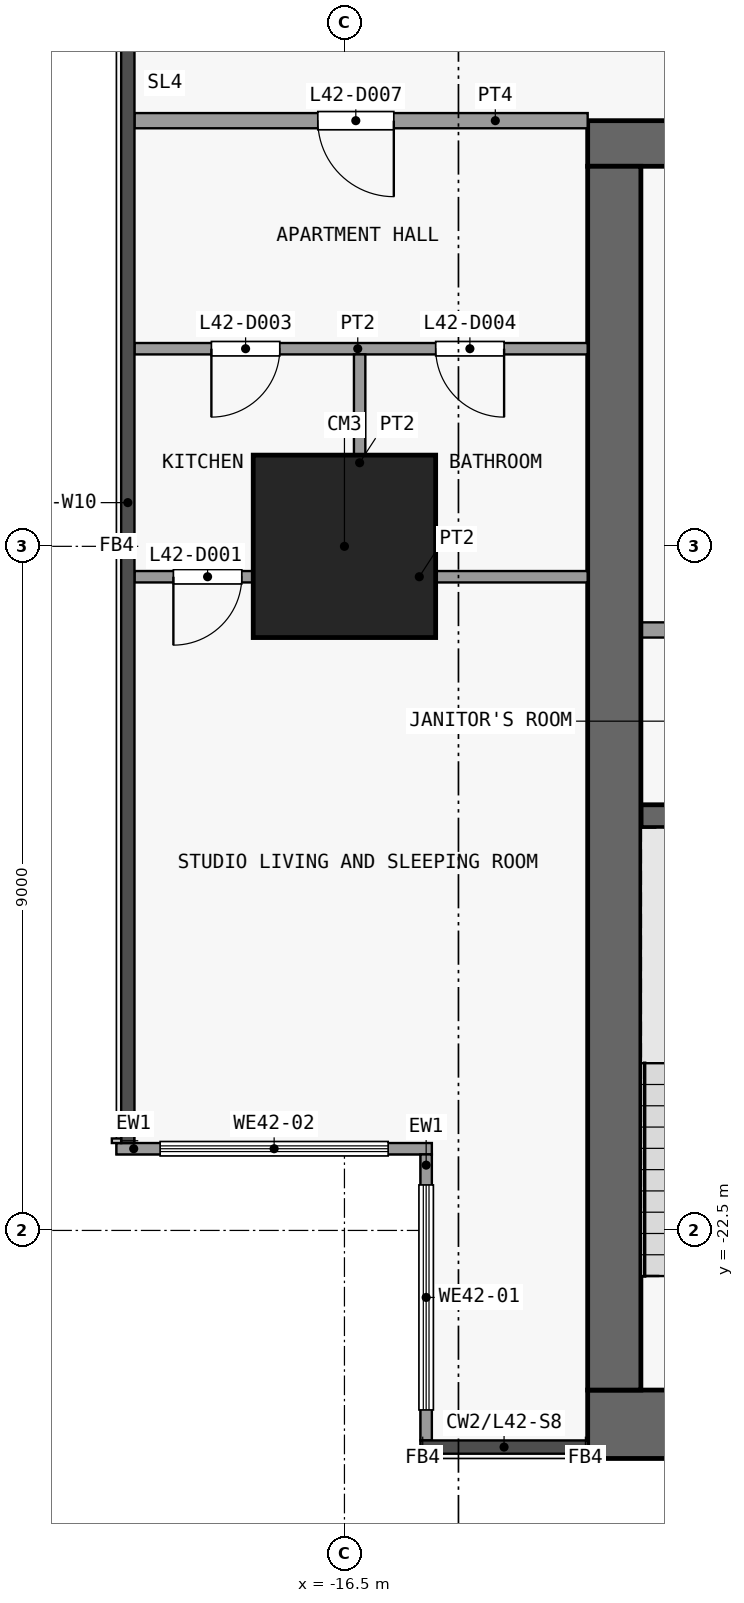
"""IFC4 building model, lengths in metres.
Left out: names, types, materials, properties, quantities, classifications, styles, units other than length and angle.
Written with IfcOpenShell. Run it as: python <this file> out.ifc"""

import sys

from ifc_helpers import new_model, si_unit, direction, frame, frame_2d, origin, origin_2d, place, context, subcontext, project, spatial, rectangle, extrude, element, fill, save


model = new_model("IFC4")
c1 = context("Model", 3, precision=1e-05, world=origin(), true_north=direction((0.0, 1.0)))
c2 = subcontext(c1, "Body", "Model", "MODEL_VIEW")
j1 = project(units=[si_unit("LENGTHUNIT", "METRE"), si_unit("PLANEANGLEUNIT", "RADIAN")], contexts=[c1])
p1 = place(None, origin())
s1 = spatial("IfcSite", under=j1, at=p1, CompositionType="ELEMENT")
p2 = place(p1, origin())
s2 = spatial("IfcBuilding", under=s1, at=p2, CompositionType="ELEMENT")
p3 = place(p2, frame((0.0, 0.0, 170.9)))
s3 = spatial("IfcBuildingStorey", under=s2, at=p3, CompositionType="ELEMENT", Elevation=170.9)
p4 = place(p3, frame((-16.5, -13.5, 0.0), z_axis=(0.0, 0.0, 1.0), x_axis=(1.0, 0.0, 0.0)))
e1 = element("IfcColumn", 1, at=p4, inside=s3, PredefinedType="COLUMN", context=c2, shape_type="SweptSolid", body=[
    extrude(rectangle(XDim=2.4, YDim=2.4, at=origin_2d()), origin(), (0.0, 0.0, 1.0), 3.6),
])
p5 = place(p3, frame((-13.3, -25.05, 0.0), z_axis=(0.0, 0.0, 1.0), x_axis=(1.0, 0.0, 0.0)))
e2 = element("IfcWall", 2, at=p5, inside=s3, PredefinedType="SHEAR", context=c2, shape_type="SweptSolid", body=[
    extrude(rectangle(XDim=26.6, YDim=0.9, at=frame_2d((13.3, 0.0))), origin(), (0.0, 0.0, 1.0), 3.3),
])
p6 = place(p3, frame((-13.3, -8.2, 0.0), z_axis=(0.0, 0.0, 1.0), x_axis=(1.0, 0.0, 0.0)))
e3 = element("IfcWall", 3, at=p6, inside=s3, PredefinedType="SHEAR", context=c2, shape_type="SweptSolid", body=[
    extrude(rectangle(XDim=26.6, YDim=0.6, at=frame_2d((13.3, 0.0))), origin(), (0.0, 0.0, 1.0), 3.3),
])
p7 = place(p6, frame((7.6, 0.0, 0.0)))
e4 = element("IfcOpeningElement", 4, at=p7, cuts=e3, PredefinedType="OPENING", context=c2, shape_type="SweptSolid", body=[
    extrude(rectangle(XDim=1.8, YDim=2.1, at=frame_2d((0.9, 1.05))), frame((0.0, 0.31, 0.0), z_axis=(0.0, -1.0, 0.0), x_axis=(1.0, 0.0, 0.0)), (0.0, 0.0, 1.0), 0.62),
])
p8 = place(p6, frame((17.2, 0.0, 0.0)))
e5 = element("IfcOpeningElement", 5, at=p8, cuts=e3, PredefinedType="OPENING", context=c2, shape_type="SweptSolid", body=[
    extrude(rectangle(XDim=1.8, YDim=2.1, at=frame_2d((0.9, 1.05))), frame((0.0, 0.31, 0.0), z_axis=(0.0, -1.0, 0.0), x_axis=(1.0, 0.0, 0.0)), (0.0, 0.0, 1.0), 0.62),
])
p9 = place(p6, frame((2.525, 0.0, 0.0)))
e6 = element("IfcOpeningElement", 6, at=p9, cuts=e3, PredefinedType="OPENING", context=c2, shape_type="SweptSolid", body=[
    extrude(rectangle(XDim=0.9, YDim=2.1, at=frame_2d((0.45, 1.05))), frame((0.0, 0.31, 0.0), z_axis=(0.0, -1.0, 0.0), x_axis=(1.0, 0.0, 0.0)), (0.0, 0.0, 1.0), 0.62),
])
p10 = place(p6, frame((23.175, 0.0, 0.0)))
e7 = element("IfcOpeningElement", 7, at=p10, cuts=e3, PredefinedType="OPENING", context=c2, shape_type="SweptSolid", body=[
    extrude(rectangle(XDim=0.9, YDim=2.1, at=frame_2d((0.45, 1.05))), frame((0.0, 0.31, 0.0), z_axis=(0.0, -1.0, 0.0), x_axis=(1.0, 0.0, 0.0)), (0.0, 0.0, 1.0), 0.62),
])
p11 = place(p3, frame((-12.95, -24.6, 0.0), z_axis=(0.0, 0.0, 1.0), x_axis=(0.0, 1.0, 0.0)))
e8 = element("IfcWall", 8, at=p11, inside=s3, PredefinedType="SHEAR", context=c2, shape_type="SweptSolid", body=[
    extrude(rectangle(XDim=16.1, YDim=0.7, at=frame_2d((8.05, 0.0))), origin(), (0.0, 0.0, 1.0), 3.3),
])
p12 = place(p3, frame((-12.6, -17.05, 0.0), z_axis=(0.0, 0.0, 1.0), x_axis=(1.0, 0.0, 0.0)))
e9 = element("IfcWall", 9, at=p12, inside=s3, PredefinedType="SHEAR", context=c2, shape_type="SweptSolid", body=[
    extrude(rectangle(XDim=3.1, YDim=0.3, at=frame_2d((1.55, 0.0))), origin(), (0.0, 0.0, 1.0), 3.3),
])
p13 = place(p3, frame((-12.6, -14.6, 0.0), z_axis=(0.0, 0.0, 1.0), x_axis=(1.0, 0.0, 0.0)))
e10 = element("IfcWall", 10, at=p13, inside=s3, PredefinedType="PARTITIONING", context=c2, shape_type="SweptSolid", body=[
    extrude(rectangle(XDim=1.45, YDim=0.2, at=frame_2d((0.725, 0.0))), origin(), (0.0, 0.0, 1.0), 3.3),
])
p14 = place(p3, frame((-15.425, -25.262, 0.0), z_axis=(0.0, 0.0, 1.0), x_axis=(0.0, 1.0, 0.0)))
e11 = element("IfcWall", 11, at=p14, inside=s3, PredefinedType="SOLIDWALL", context=c2, shape_type="SweptSolid", body=[
    extrude(rectangle(XDim=3.762, YDim=0.15, at=frame_2d((1.881, 0.0))), origin(), (0.0, 0.0, 1.0), 3.3),
])
p15 = place(p14, frame((0.401, 0.0, 0.9)))
e12 = element("IfcOpeningElement", 12, at=p15, cuts=e11, PredefinedType="OPENING", context=c2, shape_type="SweptSolid", body=[
    extrude(rectangle(XDim=2.96, YDim=2.4, at=frame_2d((1.48, 1.2))), frame((0.0, 0.085, 0.0), z_axis=(0.0, -1.0, 0.0), x_axis=(1.0, 0.0, 0.0)), (0.0, 0.0, 1.0), 0.17),
])
p16 = place(p3, frame((-15.35, -21.425, 0.0), z_axis=(0.0, 0.0, 1.0), x_axis=(-1.0, 0.0, 0.0)))
e13 = element("IfcWall", 13, at=p16, inside=s3, PredefinedType="SOLIDWALL", context=c2, shape_type="SweptSolid", body=[
    extrude(rectangle(XDim=4.15, YDim=0.15, at=frame_2d((2.075, 0.0))), origin(), (0.0, 0.0, 1.0), 3.3),
])
p17 = place(p16, frame((0.575, 0.0, 0.9)))
e14 = element("IfcOpeningElement", 14, at=p17, cuts=e13, PredefinedType="OPENING", context=c2, shape_type="SweptSolid", body=[
    extrude(rectangle(XDim=3.0, YDim=2.4, at=frame_2d((1.5, 1.2))), frame((0.0, 0.085, 0.0), z_axis=(0.0, -1.0, 0.0), x_axis=(1.0, 0.0, 0.0)), (0.0, 0.0, 1.0), 0.17),
])
p18 = place(p3, frame((-19.262, -13.9, 0.0), z_axis=(0.0, 0.0, 1.0), x_axis=(1.0, 0.0, 0.0)))
e15 = element("IfcWall", 15, at=p18, inside=s3, PredefinedType="PARTITIONING", context=c2, shape_type="SweptSolid", body=[
    extrude(rectangle(XDim=5.962, YDim=0.15, at=frame_2d((2.981, 0.0))), origin(), (0.0, 0.0, 1.0), 3.3),
])
p19 = place(p18, frame((0.512, 0.0, 0.0)))
e16 = element("IfcOpeningElement", 16, at=p19, cuts=e15, PredefinedType="OPENING", context=c2, shape_type="SweptSolid", body=[
    extrude(rectangle(XDim=0.9, YDim=2.1, at=frame_2d((0.45, 1.05))), frame((0.0, 0.085, 0.0), z_axis=(0.0, -1.0, 0.0), x_axis=(1.0, 0.0, 0.0)), (0.0, 0.0, 1.0), 0.17),
])
p20 = place(p3, frame((-19.262, -10.9, 0.0), z_axis=(0.0, 0.0, 1.0), x_axis=(1.0, 0.0, 0.0)))
e17 = element("IfcWall", 17, at=p20, inside=s3, PredefinedType="PARTITIONING", context=c2, shape_type="SweptSolid", body=[
    extrude(rectangle(XDim=5.962, YDim=0.15, at=frame_2d((2.981, 0.0))), origin(), (0.0, 0.0, 1.0), 3.3),
])
p21 = place(p20, frame((1.012, 0.0, 0.0)))
e18 = element("IfcOpeningElement", 18, at=p21, cuts=e17, PredefinedType="OPENING", context=c2, shape_type="SweptSolid", body=[
    extrude(rectangle(XDim=0.9, YDim=2.1, at=frame_2d((0.45, 1.05))), frame((0.0, 0.085, 0.0), z_axis=(0.0, -1.0, 0.0), x_axis=(1.0, 0.0, 0.0)), (0.0, 0.0, 1.0), 0.17),
])
p22 = place(p20, frame((3.963, 0.0, 0.0)))
e19 = element("IfcOpeningElement", 19, at=p22, cuts=e17, PredefinedType="OPENING", context=c2, shape_type="SweptSolid", body=[
    extrude(rectangle(XDim=0.9, YDim=2.1, at=frame_2d((0.45, 1.05))), frame((0.0, 0.085, 0.0), z_axis=(0.0, -1.0, 0.0), x_axis=(1.0, 0.0, 0.0)), (0.0, 0.0, 1.0), 0.17),
])
p23 = place(p3, frame((-19.262, -7.9, 0.0), z_axis=(0.0, 0.0, 1.0), x_axis=(1.0, 0.0, 0.0)))
e20 = element("IfcWall", 20, at=p23, inside=s3, PredefinedType="PARTITIONING", context=c2, shape_type="SweptSolid", body=[
    extrude(rectangle(XDim=5.962, YDim=0.2, at=frame_2d((2.981, 0.0))), origin(), (0.0, 0.0, 1.0), 3.3),
])
p24 = place(p23, frame((2.412, 0.0, 0.0)))
e21 = element("IfcOpeningElement", 21, at=p24, cuts=e20, PredefinedType="OPENING", context=c2, shape_type="SweptSolid", body=[
    extrude(rectangle(XDim=1.0, YDim=2.1, at=frame_2d((0.5, 1.05))), frame((0.0, 0.11, 0.0), z_axis=(0.0, -1.0, 0.0), x_axis=(1.0, 0.0, 0.0)), (0.0, 0.0, 1.0), 0.22),
])
p25 = place(p3, frame((-16.3, -13.825, 0.0), z_axis=(0.0, 0.0, 1.0), x_axis=(0.0, 1.0, 0.0)))
e22 = element("IfcWall", 22, at=p25, inside=s3, PredefinedType="PARTITIONING", context=c2, shape_type="SweptSolid", body=[
    extrude(rectangle(XDim=2.85, YDim=0.15, at=frame_2d((1.425, 0.0))), origin(), (0.0, 0.0, 1.0), 3.3),
])
p26 = place(p15, origin())
e23 = element("IfcWindow", 23, at=p26, inside=s3, PartitioningType="SINGLE_PANEL", PredefinedType="WINDOW", context=c2, shape_type="SweptSolid", body=[
    extrude(rectangle(XDim=2.96, YDim=2.4, at=frame_2d((1.48, 1.2))), frame((0.0, 0.03, 0.0), z_axis=(0.0, -1.0, 0.0), x_axis=(1.0, 0.0, 0.0)), (0.0, 0.0, 1.0), 0.06),
])
fill(e12, e23)
p27 = place(p17, origin())
e24 = element("IfcWindow", 24, at=p27, inside=s3, PartitioningType="SINGLE_PANEL", PredefinedType="WINDOW", context=c2, shape_type="SweptSolid", body=[
    extrude(rectangle(XDim=3.0, YDim=2.4, at=frame_2d((1.5, 1.2))), frame((0.0, 0.03, 0.0), z_axis=(0.0, -1.0, 0.0), x_axis=(1.0, 0.0, 0.0)), (0.0, 0.0, 1.0), 0.06),
])
fill(e14, e24)
p28 = place(p19, origin())
e25 = element("IfcDoor", 25, at=p28, inside=s3, OperationType="SINGLE_SWING_LEFT", PredefinedType="DOOR", context=c2, shape_type="SweptSolid", body=[
    extrude(rectangle(XDim=0.9, YDim=2.1, at=frame_2d((0.45, 1.05))), frame((0.0, 0.025, 0.0), z_axis=(0.0, -1.0, 0.0), x_axis=(1.0, 0.0, 0.0)), (0.0, 0.0, 1.0), 0.05),
])
fill(e16, e25)
p29 = place(p21, origin())
e26 = element("IfcDoor", 26, at=p29, inside=s3, OperationType="SINGLE_SWING_LEFT", PredefinedType="DOOR", context=c2, shape_type="SweptSolid", body=[
    extrude(rectangle(XDim=0.9, YDim=2.1, at=frame_2d((0.45, 1.05))), frame((0.0, 0.025, 0.0), z_axis=(0.0, -1.0, 0.0), x_axis=(1.0, 0.0, 0.0)), (0.0, 0.0, 1.0), 0.05),
])
fill(e18, e26)
p30 = place(p22, origin())
e27 = element("IfcDoor", 27, at=p30, inside=s3, OperationType="SINGLE_SWING_RIGHT", PredefinedType="DOOR", context=c2, shape_type="SweptSolid", body=[
    extrude(rectangle(XDim=0.9, YDim=2.1, at=frame_2d((0.45, 1.05))), frame((0.0, 0.025, 0.0), z_axis=(0.0, -1.0, 0.0), x_axis=(1.0, 0.0, 0.0)), (0.0, 0.0, 1.0), 0.05),
])
fill(e19, e27)
p31 = place(p24, origin())
e28 = element("IfcDoor", 28, at=p31, inside=s3, OperationType="SINGLE_SWING_RIGHT", PredefinedType="DOOR", context=c2, shape_type="SweptSolid", body=[
    extrude(rectangle(XDim=1.0, YDim=2.1, at=frame_2d((0.5, 1.05))), frame((0.0, 0.025, 0.0), z_axis=(0.0, -1.0, 0.0), x_axis=(1.0, 0.0, 0.0)), (0.0, 0.0, 1.0), 0.05),
])
fill(e21, e28)
save(model, sys.argv[1])
